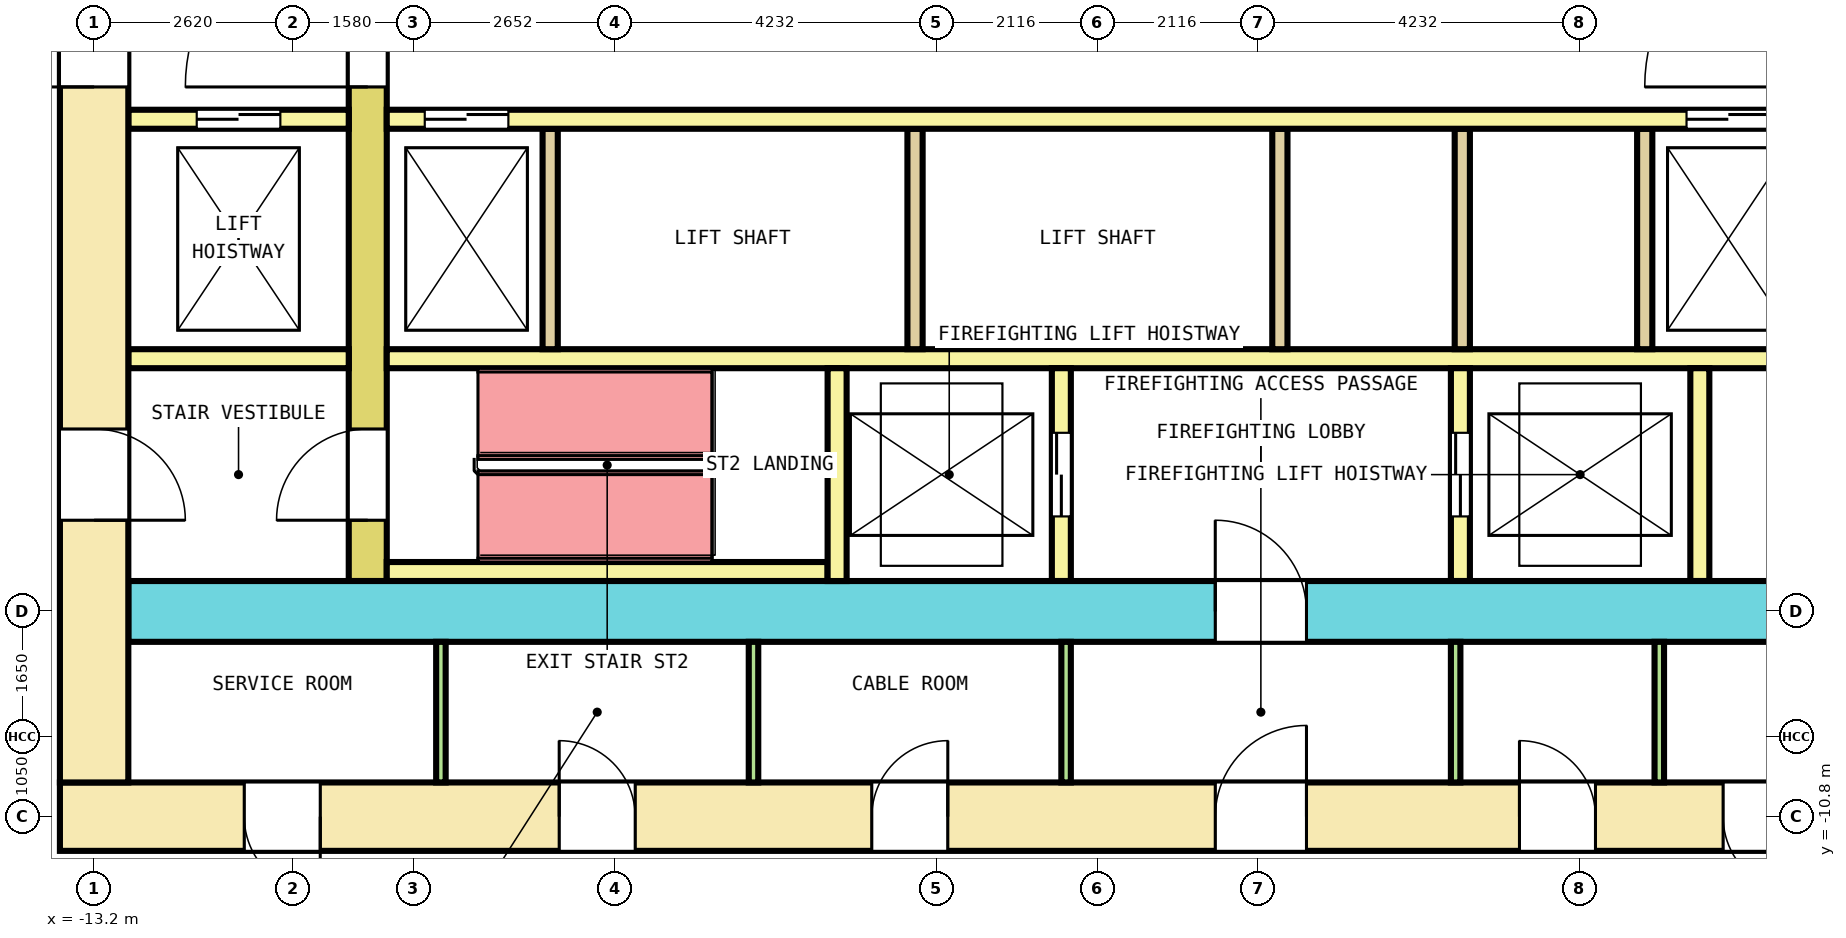
"""IFC4 building model, lengths in metres.
Left out: names, types, materials, properties, quantities, classifications, styles, units other than length and angle.
Written with IfcOpenShell. Run it as: python <this file> out.ifc"""

import sys

from ifc_helpers import new_model, si_unit, direction, frame, frame_2d, origin, place, context, subcontext, project, spatial, rectangle, extrude, element, fill, save


model = new_model("IFC4")
c1 = context("Model", 3, precision=1e-05, world=origin(), true_north=direction((0.0, 1.0)))
c2 = subcontext(c1, "Body", "Model", "MODEL_VIEW")
j1 = project(units=[si_unit("LENGTHUNIT", "METRE"), si_unit("PLANEANGLEUNIT", "RADIAN")], contexts=[c1])
p1 = place(None, origin())
s1 = spatial("IfcSite", under=j1, at=p1, CompositionType="ELEMENT")
p2 = place(p1, origin())
s2 = spatial("IfcBuilding", under=s1, at=p2, CompositionType="ELEMENT")
p3 = place(p2, frame((0.0, 0.0, 19.0)))
s3 = spatial("IfcBuildingStorey", under=s2, at=p3, CompositionType="ELEMENT", Elevation=19.0)
p4 = place(p3, frame((-13.65, -10.8, 0.0), z_axis=(0.0, 0.0, 1.0), x_axis=(1.0, 0.0, 0.0)))
e1 = element("IfcWall", 1, at=p4, inside=s3, PredefinedType="SHEAR", context=c2, shape_type="SweptSolid", body=[
    extrude(rectangle(XDim=27.3, YDim=0.9, at=frame_2d((13.65, 0.0))), origin(), (0.0, 0.0, 1.0), 4.1),
])
p5 = place(p4, frame((2.425, 0.0, 0.0)))
e2 = element("IfcOpeningElement", 2, at=p5, cuts=e1, PredefinedType="OPENING", context=c2, shape_type="SweptSolid", body=[
    extrude(rectangle(XDim=1.0, YDim=2.1, at=frame_2d((0.5, 1.05))), frame((0.0, 0.46, 0.0), z_axis=(0.0, -1.0, 0.0), x_axis=(1.0, 0.0, 0.0)), (0.0, 0.0, 1.0), 0.92),
])
p6 = place(p4, frame((6.569, 0.0, 0.0)))
e3 = element("IfcOpeningElement", 3, at=p6, cuts=e1, PredefinedType="OPENING", context=c2, shape_type="SweptSolid", body=[
    extrude(rectangle(XDim=1.0, YDim=2.1, at=frame_2d((0.5, 1.05))), frame((0.0, 0.46, 0.0), z_axis=(0.0, -1.0, 0.0), x_axis=(1.0, 0.0, 0.0)), (0.0, 0.0, 1.0), 0.92),
])
p7 = place(p4, frame((10.681, 0.0, 0.0)))
e4 = element("IfcOpeningElement", 4, at=p7, cuts=e1, PredefinedType="OPENING", context=c2, shape_type="SweptSolid", body=[
    extrude(rectangle(XDim=1.0, YDim=2.1, at=frame_2d((0.5, 1.05))), frame((0.0, 0.46, 0.0), z_axis=(0.0, -1.0, 0.0), x_axis=(1.0, 0.0, 0.0)), (0.0, 0.0, 1.0), 0.92),
])
p8 = place(p4, frame((19.202, 0.0, 0.0)))
e5 = element("IfcOpeningElement", 5, at=p8, cuts=e1, PredefinedType="OPENING", context=c2, shape_type="SweptSolid", body=[
    extrude(rectangle(XDim=1.0, YDim=2.1, at=frame_2d((0.5, 1.05))), frame((0.0, 0.46, 0.0), z_axis=(0.0, -1.0, 0.0), x_axis=(1.0, 0.0, 0.0)), (0.0, 0.0, 1.0), 0.92),
])
p9 = place(p4, frame((21.881, 0.0, 0.0)))
e6 = element("IfcOpeningElement", 6, at=p9, cuts=e1, PredefinedType="OPENING", context=c2, shape_type="SweptSolid", body=[
    extrude(rectangle(XDim=1.0, YDim=2.1, at=frame_2d((0.5, 1.05))), frame((0.0, 0.46, 0.0), z_axis=(0.0, -1.0, 0.0), x_axis=(1.0, 0.0, 0.0)), (0.0, 0.0, 1.0), 0.92),
])
p10 = place(p4, frame((24.592, 0.0, 0.0)))
e7 = element("IfcOpeningElement", 7, at=p10, cuts=e1, PredefinedType="OPENING", context=c2, shape_type="SweptSolid", body=[
    extrude(rectangle(XDim=1.0, YDim=2.1, at=frame_2d((0.5, 1.05))), frame((0.0, 0.46, 0.0), z_axis=(0.0, -1.0, 0.0), x_axis=(1.0, 0.0, 0.0)), (0.0, 0.0, 1.0), 0.92),
])
p11 = place(p4, frame((15.2, 0.0, 0.0)))
e8 = element("IfcOpeningElement", 8, at=p11, cuts=e1, PredefinedType="OPENING", context=c2, shape_type="SweptSolid", body=[
    extrude(rectangle(XDim=1.2, YDim=2.1, at=frame_2d((0.6, 1.05))), frame((0.0, 0.46, 0.0), z_axis=(0.0, -1.0, 0.0), x_axis=(1.0, 0.0, 0.0)), (0.0, 0.0, 1.0), 0.92),
])
p12 = place(p3, frame((-13.2, -10.35, 0.0), z_axis=(0.0, 0.0, 1.0), x_axis=(0.0, 1.0, 0.0)))
e9 = element("IfcWall", 9, at=p12, inside=s3, PredefinedType="SHEAR", context=c2, shape_type="SweptSolid", body=[
    extrude(rectangle(XDim=20.7, YDim=0.9, at=frame_2d((10.35, 0.0))), origin(), (0.0, 0.0, 1.0), 4.1),
])
p13 = place(p12, frame((9.15, 0.0, 0.0)))
e10 = element("IfcOpeningElement", 10, at=p13, cuts=e9, PredefinedType="OPENING", context=c2, shape_type="SweptSolid", body=[
    extrude(rectangle(XDim=2.4, YDim=2.1, at=frame_2d((1.2, 1.05))), frame((0.0, 0.46, 0.0), z_axis=(0.0, -1.0, 0.0), x_axis=(1.0, 0.0, 0.0)), (0.0, 0.0, 1.0), 0.92),
])
p14 = place(p12, frame((16.05, 0.0, 0.0)))
e11 = element("IfcOpeningElement", 11, at=p14, cuts=e9, PredefinedType="OPENING", context=c2, shape_type="SweptSolid", body=[
    extrude(rectangle(XDim=1.2, YDim=2.1, at=frame_2d((0.6, 1.05))), frame((0.0, 0.46, 0.0), z_axis=(0.0, -1.0, 0.0), x_axis=(1.0, 0.0, 0.0)), (0.0, 0.0, 1.0), 0.92),
])
p15 = place(p12, frame((3.45, 0.0, 0.0)))
e12 = element("IfcOpeningElement", 12, at=p15, cuts=e9, PredefinedType="OPENING", context=c2, shape_type="SweptSolid", body=[
    extrude(rectangle(XDim=1.2, YDim=2.1, at=frame_2d((0.6, 1.05))), frame((0.0, 0.46, 0.0), z_axis=(0.0, -1.0, 0.0), x_axis=(1.0, 0.0, 0.0)), (0.0, 0.0, 1.0), 0.92),
])
p16 = place(p3, frame((-12.75, -8.1, 0.0), z_axis=(0.0, 0.0, 1.0), x_axis=(1.0, 0.0, 0.0)))
e13 = element("IfcWall", 13, at=p16, inside=s3, PredefinedType="SHEAR", context=c2, shape_type="SweptSolid", body=[
    extrude(rectangle(XDim=25.5, YDim=0.8, at=frame_2d((12.75, 0.0))), origin(), (0.0, 0.0, 1.0), 4.1),
])
p17 = place(p16, frame((14.3, 0.0, 0.0)))
e14 = element("IfcOpeningElement", 14, at=p17, cuts=e13, PredefinedType="OPENING", context=c2, shape_type="SweptSolid", body=[
    extrude(rectangle(XDim=1.2, YDim=2.1, at=frame_2d((0.6, 1.05))), frame((0.0, 0.41, 0.0), z_axis=(0.0, -1.0, 0.0), x_axis=(1.0, 0.0, 0.0)), (0.0, 0.0, 1.0), 0.82),
])
p18 = place(p3, frame((-9.6, -7.7, 0.0), z_axis=(0.0, 0.0, 1.0), x_axis=(0.0, 1.0, 0.0)))
e15 = element("IfcWall", 15, at=p18, inside=s3, PredefinedType="SHEAR", context=c2, shape_type="SweptSolid", body=[
    extrude(rectangle(XDim=15.4, YDim=0.5, at=frame_2d((7.7, 0.0))), origin(), (0.0, 0.0, 1.0), 4.1),
])
p19 = place(p18, frame((6.5, 0.0, 0.0)))
e16 = element("IfcOpeningElement", 16, at=p19, cuts=e15, PredefinedType="OPENING", context=c2, shape_type="SweptSolid", body=[
    extrude(rectangle(XDim=2.4, YDim=2.1, at=frame_2d((1.2, 1.05))), frame((0.0, 0.26, 0.0), z_axis=(0.0, -1.0, 0.0), x_axis=(1.0, 0.0, 0.0)), (0.0, 0.0, 1.0), 0.52),
])
p20 = place(p18, frame((13.4, 0.0, 0.0)))
e17 = element("IfcOpeningElement", 17, at=p20, cuts=e15, PredefinedType="OPENING", context=c2, shape_type="SweptSolid", body=[
    extrude(rectangle(XDim=1.2, YDim=2.1, at=frame_2d((0.6, 1.05))), frame((0.0, 0.26, 0.0), z_axis=(0.0, -1.0, 0.0), x_axis=(1.0, 0.0, 0.0)), (0.0, 0.0, 1.0), 0.52),
])
p21 = place(p18, frame((0.8, 0.0, 0.0)))
e18 = element("IfcOpeningElement", 18, at=p21, cuts=e15, PredefinedType="OPENING", context=c2, shape_type="SweptSolid", body=[
    extrude(rectangle(XDim=1.2, YDim=2.1, at=frame_2d((0.6, 1.05))), frame((0.0, 0.26, 0.0), z_axis=(0.0, -1.0, 0.0), x_axis=(1.0, 0.0, 0.0)), (0.0, 0.0, 1.0), 0.52),
])
p22 = place(p3, frame((-12.75, -1.625, 0.0), z_axis=(0.0, 0.0, 1.0), x_axis=(1.0, 0.0, 0.0)))
e19 = element("IfcWall", 19, at=p22, inside=s3, PredefinedType="SOLIDWALL", context=c2, shape_type="SweptSolid", body=[
    extrude(rectangle(XDim=2.9, YDim=0.25, at=frame_2d((1.45, 0.0))), origin(), (0.0, 0.0, 1.0), 4.1),
])
p23 = place(p22, frame((0.9, 0.0, 0.0)))
e20 = element("IfcOpeningElement", 20, at=p23, cuts=e19, PredefinedType="OPENING", context=c2, shape_type="SweptSolid", body=[
    extrude(rectangle(XDim=1.1, YDim=2.1, at=frame_2d((0.55, 1.05))), frame((0.0, 0.135, 0.0), z_axis=(0.0, -1.0, 0.0), x_axis=(1.0, 0.0, 0.0)), (0.0, 0.0, 1.0), 0.27),
])
p24 = place(p3, frame((-9.35, -1.625, 0.0), z_axis=(0.0, 0.0, 1.0), x_axis=(1.0, 0.0, 0.0)))
e21 = element("IfcWall", 21, at=p24, inside=s3, PredefinedType="SOLIDWALL", context=c2, shape_type="SweptSolid", body=[
    extrude(rectangle(XDim=18.7, YDim=0.25, at=frame_2d((9.35, 0.0))), origin(), (0.0, 0.0, 1.0), 4.1),
])
p25 = place(p24, frame((0.5, 0.0, 0.0)))
e22 = element("IfcOpeningElement", 22, at=p25, cuts=e21, PredefinedType="OPENING", context=c2, shape_type="SweptSolid", body=[
    extrude(rectangle(XDim=1.1, YDim=2.1, at=frame_2d((0.55, 1.05))), frame((0.0, 0.135, 0.0), z_axis=(0.0, -1.0, 0.0), x_axis=(1.0, 0.0, 0.0)), (0.0, 0.0, 1.0), 0.27),
])
p26 = place(p24, frame((17.1, 0.0, 0.0)))
e23 = element("IfcOpeningElement", 23, at=p26, cuts=e21, PredefinedType="OPENING", context=c2, shape_type="SweptSolid", body=[
    extrude(rectangle(XDim=1.1, YDim=2.1, at=frame_2d((0.55, 1.05))), frame((0.0, 0.135, 0.0), z_axis=(0.0, -1.0, 0.0), x_axis=(1.0, 0.0, 0.0)), (0.0, 0.0, 1.0), 0.27),
])
p27 = place(p3, frame((-12.75, -4.775, 0.0), z_axis=(0.0, 0.0, 1.0), x_axis=(1.0, 0.0, 0.0)))
e24 = element("IfcWall", 24, at=p27, inside=s3, PredefinedType="SOLIDWALL", context=c2, shape_type="SweptSolid", body=[
    extrude(rectangle(XDim=2.9, YDim=0.25, at=frame_2d((1.45, 0.0))), origin(), (0.0, 0.0, 1.0), 4.1),
])
p28 = place(p3, frame((-9.35, -4.775, 0.0), z_axis=(0.0, 0.0, 1.0), x_axis=(1.0, 0.0, 0.0)))
e25 = element("IfcWall", 25, at=p28, inside=s3, PredefinedType="SOLIDWALL", context=c2, shape_type="SweptSolid", body=[
    extrude(rectangle(XDim=18.7, YDim=0.25, at=frame_2d((9.35, 0.0))), origin(), (0.0, 0.0, 1.0), 4.1),
])
for number, where, z_axis, x_axis in (
    (26, (-7.2, -4.65, 0.0), (0.0, 0.0, 1.0), (0.0, 1.0, 0.0)),
    (27, (-2.4, -4.65, 0.0), (0.0, 0.0, 1.0), (0.0, 1.0, 0.0)),
    (28, (2.4, -4.65, 0.0), (0.0, 0.0, 1.0), (0.0, 1.0, 0.0)),
    (29, (4.8, -4.65, 0.0), (0.0, 0.0, 1.0), (0.0, 1.0, 0.0)),
    (30, (7.2, -4.65, 0.0), (0.0, 0.0, 1.0), (0.0, 1.0, 0.0)),
):
    element("IfcWall", number, at=place(p3, frame(where, z_axis=z_axis, x_axis=x_axis)), inside=s3, PredefinedType="SOLIDWALL", context=c2, shape_type="SweptSolid", body=[
        extrude(rectangle(XDim=2.9, YDim=0.2, at=frame_2d((1.45, 0.0))), origin(), (0.0, 0.0, 1.0), 4.1),
    ])
p29 = place(p3, frame((-9.35, -7.575, 0.0), z_axis=(0.0, 0.0, 1.0), x_axis=(1.0, 0.0, 0.0)))
e31 = element("IfcWall", 31, at=p29, inside=s3, PredefinedType="SOLIDWALL", context=c2, shape_type="SweptSolid", body=[
    extrude(rectangle(XDim=5.8, YDim=0.25, at=frame_2d((2.9, 0.0))), origin(), (0.0, 0.0, 1.0), 4.1),
])
p30 = place(p3, frame((-3.425, -7.7, 0.0), z_axis=(0.0, 0.0, 1.0), x_axis=(0.0, 1.0, 0.0)))
e32 = element("IfcWall", 32, at=p30, inside=s3, PredefinedType="SOLIDWALL", context=c2, shape_type="SweptSolid", body=[
    extrude(rectangle(XDim=2.8, YDim=0.25, at=frame_2d((1.4, 0.0))), origin(), (0.0, 0.0, 1.0), 4.1),
])
p31 = place(p3, frame((-0.475, -7.7, 0.0), z_axis=(0.0, 0.0, 1.0), x_axis=(0.0, 1.0, 0.0)))
e33 = element("IfcWall", 33, at=p31, inside=s3, PredefinedType="SOLIDWALL", context=c2, shape_type="SweptSolid", body=[
    extrude(rectangle(XDim=2.8, YDim=0.25, at=frame_2d((1.4, 0.0))), origin(), (0.0, 0.0, 1.0), 4.1),
])
p32 = place(p31, frame((0.85, 0.0, 0.0)))
e34 = element("IfcOpeningElement", 34, at=p32, cuts=e33, PredefinedType="OPENING", context=c2, shape_type="SweptSolid", body=[
    extrude(rectangle(XDim=1.1, YDim=2.1, at=frame_2d((0.55, 1.05))), frame((0.0, 0.135, 0.0), z_axis=(0.0, -1.0, 0.0), x_axis=(1.0, 0.0, 0.0)), (0.0, 0.0, 1.0), 0.27),
])
p33 = place(p3, frame((4.775, -7.7, 0.0), z_axis=(0.0, 0.0, 1.0), x_axis=(0.0, 1.0, 0.0)))
e35 = element("IfcWall", 35, at=p33, inside=s3, PredefinedType="SOLIDWALL", context=c2, shape_type="SweptSolid", body=[
    extrude(rectangle(XDim=2.8, YDim=0.25, at=frame_2d((1.4, 0.0))), origin(), (0.0, 0.0, 1.0), 4.1),
])
p34 = place(p33, frame((0.85, 0.0, 0.0)))
e36 = element("IfcOpeningElement", 36, at=p34, cuts=e35, PredefinedType="OPENING", context=c2, shape_type="SweptSolid", body=[
    extrude(rectangle(XDim=1.1, YDim=2.1, at=frame_2d((0.55, 1.05))), frame((0.0, 0.135, 0.0), z_axis=(0.0, -1.0, 0.0), x_axis=(1.0, 0.0, 0.0)), (0.0, 0.0, 1.0), 0.27),
])
p35 = place(p3, frame((7.925, -7.7, 0.0), z_axis=(0.0, 0.0, 1.0), x_axis=(0.0, 1.0, 0.0)))
e37 = element("IfcWall", 37, at=p35, inside=s3, PredefinedType="SOLIDWALL", context=c2, shape_type="SweptSolid", body=[
    extrude(rectangle(XDim=2.8, YDim=0.25, at=frame_2d((1.4, 0.0))), origin(), (0.0, 0.0, 1.0), 4.1),
])
for number, where, z_axis, x_axis in (
    (38, (-8.637, -10.35, 0.0), (0.0, 0.0, 1.0), (0.0, 1.0, 0.0)),
    (39, (-4.525, -10.35, 0.0), (0.0, 0.0, 1.0), (0.0, 1.0, 0.0)),
    (40, (-0.413, -10.35, 0.0), (0.0, 0.0, 1.0), (0.0, 1.0, 0.0)),
    (41, (4.712, -10.35, 0.0), (0.0, 0.0, 1.0), (0.0, 1.0, 0.0)),
    (42, (7.392, -10.35, 0.0), (0.0, 0.0, 1.0), (0.0, 1.0, 0.0)),
):
    element("IfcWall", number, at=place(p3, frame(where, z_axis=z_axis, x_axis=x_axis)), inside=s3, PredefinedType="PARTITIONING", context=c2, shape_type="SweptSolid", body=[
        extrude(rectangle(XDim=1.85, YDim=0.125, at=frame_2d((0.925, 0.0))), origin(), (0.0, 0.0, 1.0), 4.1),
    ])
p36 = place(p23, origin())
e43 = element("IfcDoor", 43, at=p36, inside=s3, OperationType="DOUBLE_DOOR_SLIDING", PredefinedType="DOOR", context=c2, shape_type="SweptSolid", body=[
    extrude(rectangle(XDim=1.1, YDim=2.1, at=frame_2d((0.55, 1.05))), frame((0.0, 0.075, 0.0), z_axis=(0.0, -1.0, 0.0), x_axis=(1.0, 0.0, 0.0)), (0.0, 0.0, 1.0), 0.15),
])
fill(e20, e43)
p37 = place(p25, origin())
e44 = element("IfcDoor", 44, at=p37, inside=s3, OperationType="DOUBLE_DOOR_SLIDING", PredefinedType="DOOR", context=c2, shape_type="SweptSolid", body=[
    extrude(rectangle(XDim=1.1, YDim=2.1, at=frame_2d((0.55, 1.05))), frame((0.0, 0.075, 0.0), z_axis=(0.0, -1.0, 0.0), x_axis=(1.0, 0.0, 0.0)), (0.0, 0.0, 1.0), 0.15),
])
fill(e22, e44)
p38 = place(p26, origin())
e45 = element("IfcDoor", 45, at=p38, inside=s3, OperationType="DOUBLE_DOOR_SLIDING", PredefinedType="DOOR", context=c2, shape_type="SweptSolid", body=[
    extrude(rectangle(XDim=1.1, YDim=2.1, at=frame_2d((0.55, 1.05))), frame((0.0, 0.075, 0.0), z_axis=(0.0, -1.0, 0.0), x_axis=(1.0, 0.0, 0.0)), (0.0, 0.0, 1.0), 0.15),
])
fill(e23, e45)
p39 = place(p32, origin())
e46 = element("IfcDoor", 46, at=p39, inside=s3, OperationType="DOUBLE_DOOR_SLIDING", PredefinedType="DOOR", context=c2, shape_type="SweptSolid", body=[
    extrude(rectangle(XDim=1.1, YDim=2.1, at=frame_2d((0.55, 1.05))), frame((0.0, 0.075, 0.0), z_axis=(0.0, -1.0, 0.0), x_axis=(1.0, 0.0, 0.0)), (0.0, 0.0, 1.0), 0.15),
])
fill(e34, e46)
p40 = place(p34, origin())
e47 = element("IfcDoor", 47, at=p40, inside=s3, OperationType="DOUBLE_DOOR_SLIDING", PredefinedType="DOOR", context=c2, shape_type="SweptSolid", body=[
    extrude(rectangle(XDim=1.1, YDim=2.1, at=frame_2d((0.55, 1.05))), frame((0.0, 0.075, 0.0), z_axis=(0.0, -1.0, 0.0), x_axis=(1.0, 0.0, 0.0)), (0.0, 0.0, 1.0), 0.15),
])
fill(e36, e47)
p41 = place(p19, origin())
e48 = element("IfcDoor", 48, at=p41, inside=s3, OperationType="DOUBLE_DOOR_SINGLE_SWING", PredefinedType="DOOR", context=c2, shape_type="SweptSolid", body=[
    extrude(rectangle(XDim=2.4, YDim=2.1, at=frame_2d((1.2, 1.05))), frame((0.0, 0.2, 0.0), z_axis=(0.0, -1.0, 0.0), x_axis=(1.0, 0.0, 0.0)), (0.0, 0.0, 1.0), 0.4),
])
fill(e16, e48)
p42 = place(p13, origin())
e49 = element("IfcDoor", 49, at=p42, inside=s3, OperationType="DOUBLE_DOOR_SINGLE_SWING", PredefinedType="DOOR", context=c2, shape_type="SweptSolid", body=[
    extrude(rectangle(XDim=2.4, YDim=2.1, at=frame_2d((1.2, 1.05))), frame((0.0, 0.3, 0.0), z_axis=(0.0, -1.0, 0.0), x_axis=(1.0, 0.0, 0.0)), (0.0, 0.0, 1.0), 0.6),
])
fill(e10, e49)
p43 = place(p21, origin())
e50 = element("IfcDoor", 50, at=p43, inside=s3, OperationType="SINGLE_SWING_RIGHT", PredefinedType="DOOR", context=c2, shape_type="SweptSolid", body=[
    extrude(rectangle(XDim=1.2, YDim=2.1, at=frame_2d((0.6, 1.05))), frame((0.0, 0.2, 0.0), z_axis=(0.0, -1.0, 0.0), x_axis=(1.0, 0.0, 0.0)), (0.0, 0.0, 1.0), 0.4),
])
fill(e18, e50)
p44 = place(p15, origin())
e51 = element("IfcDoor", 51, at=p44, inside=s3, OperationType="SINGLE_SWING_LEFT", PredefinedType="DOOR", context=c2, shape_type="SweptSolid", body=[
    extrude(rectangle(XDim=1.2, YDim=2.1, at=frame_2d((0.6, 1.05))), frame((0.0, 0.3, 0.0), z_axis=(0.0, -1.0, 0.0), x_axis=(1.0, 0.0, 0.0)), (0.0, 0.0, 1.0), 0.6),
])
fill(e12, e51)
p45 = place(p17, origin())
e52 = element("IfcDoor", 52, at=p45, inside=s3, OperationType="SINGLE_SWING_RIGHT", PredefinedType="DOOR", context=c2, shape_type="SweptSolid", body=[
    extrude(rectangle(XDim=1.2, YDim=2.1, at=frame_2d((0.6, 1.05))), frame((0.0, 0.3, 0.0), z_axis=(0.0, -1.0, 0.0), x_axis=(1.0, 0.0, 0.0)), (0.0, 0.0, 1.0), 0.6),
])
fill(e14, e52)
p46 = place(p5, origin())
e53 = element("IfcDoor", 53, at=p46, inside=s3, OperationType="SINGLE_SWING_RIGHT", PredefinedType="DOOR", context=c2, shape_type="SweptSolid", body=[
    extrude(rectangle(XDim=1.0, YDim=2.1, at=frame_2d((0.5, 1.05))), frame((0.0, 0.3, 0.0), z_axis=(0.0, -1.0, 0.0), x_axis=(1.0, 0.0, 0.0)), (0.0, 0.0, 1.0), 0.6),
])
fill(e2, e53)
p47 = place(p6, origin())
e54 = element("IfcDoor", 54, at=p47, inside=s3, OperationType="SINGLE_SWING_LEFT", PredefinedType="DOOR", context=c2, shape_type="SweptSolid", body=[
    extrude(rectangle(XDim=1.0, YDim=2.1, at=frame_2d((0.5, 1.05))), frame((0.0, 0.3, 0.0), z_axis=(0.0, -1.0, 0.0), x_axis=(1.0, 0.0, 0.0)), (0.0, 0.0, 1.0), 0.6),
])
fill(e3, e54)
p48 = place(p7, origin())
e55 = element("IfcDoor", 55, at=p48, inside=s3, OperationType="SINGLE_SWING_RIGHT", PredefinedType="DOOR", context=c2, shape_type="SweptSolid", body=[
    extrude(rectangle(XDim=1.0, YDim=2.1, at=frame_2d((0.5, 1.05))), frame((0.0, 0.3, 0.0), z_axis=(0.0, -1.0, 0.0), x_axis=(1.0, 0.0, 0.0)), (0.0, 0.0, 1.0), 0.6),
])
fill(e4, e55)
p49 = place(p8, origin())
e56 = element("IfcDoor", 56, at=p49, inside=s3, OperationType="SINGLE_SWING_LEFT", PredefinedType="DOOR", context=c2, shape_type="SweptSolid", body=[
    extrude(rectangle(XDim=1.0, YDim=2.1, at=frame_2d((0.5, 1.05))), frame((0.0, 0.3, 0.0), z_axis=(0.0, -1.0, 0.0), x_axis=(1.0, 0.0, 0.0)), (0.0, 0.0, 1.0), 0.6),
])
fill(e5, e56)
p50 = place(p9, origin())
e57 = element("IfcDoor", 57, at=p50, inside=s3, OperationType="SINGLE_SWING_RIGHT", PredefinedType="DOOR", context=c2, shape_type="SweptSolid", body=[
    extrude(rectangle(XDim=1.0, YDim=2.1, at=frame_2d((0.5, 1.05))), frame((0.0, 0.3, 0.0), z_axis=(0.0, -1.0, 0.0), x_axis=(1.0, 0.0, 0.0)), (0.0, 0.0, 1.0), 0.6),
])
fill(e6, e57)
p51 = place(p11, origin())
e58 = element("IfcDoor", 58, at=p51, inside=s3, OperationType="SINGLE_SWING_RIGHT", PredefinedType="DOOR", context=c2, shape_type="SweptSolid", body=[
    extrude(rectangle(XDim=1.2, YDim=2.1, at=frame_2d((0.6, 1.05))), frame((0.0, 0.3, 0.0), z_axis=(0.0, -1.0, 0.0), x_axis=(1.0, 0.0, 0.0)), (0.0, 0.0, 1.0), 0.6),
])
fill(e8, e58)
save(model, sys.argv[1])
